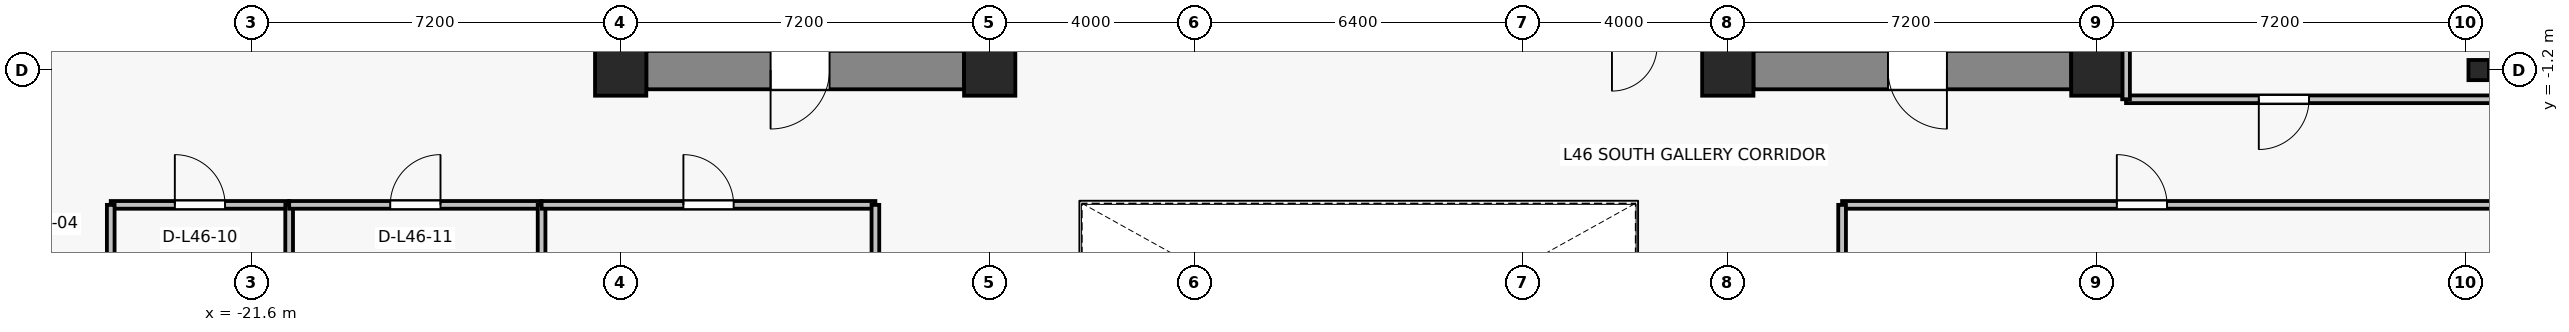
"""IFC4 building model, lengths in metres.
Left out: names, types, materials, properties, quantities, classifications, styles, units other than length and angle.
Written with IfcOpenShell. Run it as: python <this file> out.ifc"""

import sys

from ifc_helpers import new_model, si_unit, direction, frame, frame_2d, origin, origin_2d, place, context, subcontext, project, spatial, rectangle, i_section, extrude, source, transform, mapped, element, fill, save


model = new_model("IFC4")
c1 = context("Model", 3, precision=1e-05, world=origin(), true_north=direction((0.0, 1.0)))
c2 = subcontext(c1, "Body", "Model", "MODEL_VIEW")
j1 = project(units=[si_unit("LENGTHUNIT", "METRE"), si_unit("PLANEANGLEUNIT", "RADIAN")], contexts=[c1])
p1 = place(None, origin())
s1 = spatial("IfcSite", under=j1, at=p1, CompositionType="ELEMENT")
p2 = place(p1, origin())
s2 = spatial("IfcBuilding", under=s1, at=p2, CompositionType="ELEMENT")
p3 = place(p2, frame((0.0, 0.0, 166.0)))
s3 = spatial("IfcBuildingStorey", under=s2, at=p3, CompositionType="ELEMENT", Elevation=166.0)
for number, where, z_axis, x_axis in (
    (1, (-14.4, -1.2, 0.0), (0.0, 0.0, 1.0), (1.0, 0.0, 0.0)),
    (2, (-7.2, -1.2, 0.0), (0.0, 0.0, 1.0), (1.0, 0.0, 0.0)),
    (3, (7.2, -1.2, 0.0), (0.0, 0.0, 1.0), (1.0, 0.0, 0.0)),
    (4, (14.4, -1.2, 0.0), (0.0, 0.0, 1.0), (1.0, 0.0, 0.0)),
):
    element("IfcColumn", number, at=place(p3, frame(where, z_axis=z_axis, x_axis=x_axis)), inside=s3, PredefinedType="COLUMN", context=c2, shape_type="SweptSolid", body=[
        extrude(rectangle(XDim=1.0, YDim=1.0, at=origin_2d()), origin(), (0.0, 0.0, 1.0), 3.3),
    ])
p4 = place(p3, frame((21.85, -1.2, 0.0), z_axis=(0.0, 0.0, 1.0), x_axis=(1.0, 0.0, 0.0)))
e5 = element("IfcColumn", 5, at=p4, inside=s3, PredefinedType="COLUMN", context=c2, shape_type="SweptSolid", body=[
    extrude(i_section(OverallWidth=0.399, OverallDepth=0.394, WebThickness=0.023, FlangeThickness=0.037, FilletRadius=0.015, at=origin_2d()), origin(), (0.0, 0.0, 1.0), 3.3),
])
p5 = place(p3, frame((-7.7, -1.2, 0.0), z_axis=(0.0, 0.0, 1.0), x_axis=(-1.0, 0.0, 0.0)))
e6 = element("IfcWall", 6, at=p5, inside=s3, PredefinedType="SHEAR", context=c2, shape_type="SweptSolid", body=[
    extrude(rectangle(XDim=6.2, YDim=0.75, at=frame_2d((3.1, 0.0))), origin(), (0.0, 0.0, 1.0), 3.075),
])
p6 = place(p5, frame((2.625, 0.0, 0.0)))
e7 = element("IfcOpeningElement", 7, at=p6, cuts=e6, PredefinedType="OPENING", context=c2, shape_type="SweptSolid", body=[
    extrude(rectangle(XDim=1.15, YDim=2.15, at=frame_2d((0.575, 1.075))), frame((0.0, 0.385, 0.0), z_axis=(0.0, -1.0, 0.0), x_axis=(1.0, 0.0, 0.0)), (0.0, 0.0, 1.0), 0.77),
])
p7 = place(p3, frame((13.9, -1.2, 0.0), z_axis=(0.0, 0.0, 1.0), x_axis=(-1.0, 0.0, 0.0)))
e8 = element("IfcWall", 8, at=p7, inside=s3, PredefinedType="SHEAR", context=c2, shape_type="SweptSolid", body=[
    extrude(rectangle(XDim=6.2, YDim=0.75, at=frame_2d((3.1, 0.0))), origin(), (0.0, 0.0, 1.0), 3.075),
])
p8 = place(p7, frame((2.425, 0.0, 0.0)))
e9 = element("IfcOpeningElement", 9, at=p8, cuts=e8, PredefinedType="OPENING", context=c2, shape_type="SweptSolid", body=[
    extrude(rectangle(XDim=1.15, YDim=2.15, at=frame_2d((0.575, 1.075))), frame((0.0, 0.385, 0.0), z_axis=(0.0, -1.0, 0.0), x_axis=(1.0, 0.0, 0.0)), (0.0, 0.0, 1.0), 0.77),
])
p9 = place(p3, frame((-24.349, -3.83, 0.0), z_axis=(0.0, 0.0, 1.0), x_axis=(1.0, 0.0, 0.0)))
e10 = element("IfcWall", 10, at=p9, inside=s3, PredefinedType="PARTITIONING", context=c2, shape_type="SweptSolid", body=[
    extrude(rectangle(XDim=3.481, YDim=0.15, at=frame_2d((1.74, 0.0))), origin(), (0.0, 0.0, 1.0), 3.075),
])
p10 = place(p9, frame((1.25, 0.0, 0.0)))
e11 = element("IfcOpeningElement", 11, at=p10, cuts=e10, PredefinedType="OPENING", context=c2, shape_type="SweptSolid", body=[
    extrude(rectangle(XDim=0.98, YDim=2.15, at=frame_2d((0.49, 1.075))), frame((0.0, 0.085, 0.0), z_axis=(0.0, -1.0, 0.0), x_axis=(1.0, 0.0, 0.0)), (0.0, 0.0, 1.0), 0.17),
])
for number, where, z_axis, x_axis in (
    (12, (-24.349, -7.32, 0.0), (0.0, 0.0, 1.0), (0.0, 1.0, 0.0)),
    (13, (-20.868, -3.83, 0.0), (0.0, 0.0, 1.0), (0.0, -1.0, 0.0)),
):
    element("IfcWall", number, at=place(p3, frame(where, z_axis=z_axis, x_axis=x_axis)), inside=s3, PredefinedType="PARTITIONING", context=c2, shape_type="SweptSolid", body=[
        extrude(rectangle(XDim=3.49, YDim=0.15, at=frame_2d((1.745, 0.0))), origin(), (0.0, 0.0, 1.0), 3.075),
    ])
p11 = place(p3, frame((-20.868, -3.83, 0.0), z_axis=(0.0, 0.0, 1.0), x_axis=(1.0, 0.0, 0.0)))
e14 = element("IfcWall", 14, at=p11, inside=s3, PredefinedType="PARTITIONING", context=c2, shape_type="SweptSolid", body=[
    extrude(rectangle(XDim=4.925, YDim=0.15, at=frame_2d((2.462, 0.0))), origin(), (0.0, 0.0, 1.0), 3.075),
])
p12 = place(p11, frame((1.973, 0.0, 0.0)))
e15 = element("IfcOpeningElement", 15, at=p12, cuts=e14, PredefinedType="OPENING", context=c2, shape_type="SweptSolid", body=[
    extrude(rectangle(XDim=0.98, YDim=2.15, at=frame_2d((0.49, 1.075))), frame((0.0, 0.085, 0.0), z_axis=(0.0, -1.0, 0.0), x_axis=(1.0, 0.0, 0.0)), (0.0, 0.0, 1.0), 0.17),
])
p13 = place(p3, frame((-15.943, -3.83, 0.0), z_axis=(0.0, 0.0, 1.0), x_axis=(0.0, -1.0, 0.0)))
e16 = element("IfcWall", 16, at=p13, inside=s3, PredefinedType="PARTITIONING", context=c2, shape_type="SweptSolid", body=[
    extrude(rectangle(XDim=3.49, YDim=0.15, at=frame_2d((1.745, 0.0))), origin(), (0.0, 0.0, 1.0), 3.075),
])
p14 = place(p3, frame((-15.943, -3.83, 0.0), z_axis=(0.0, 0.0, 1.0), x_axis=(1.0, 0.0, 0.0)))
e17 = element("IfcWall", 17, at=p14, inside=s3, PredefinedType="PARTITIONING", context=c2, shape_type="SweptSolid", body=[
    extrude(rectangle(XDim=6.513, YDim=0.15, at=frame_2d((3.257, 0.0))), origin(), (0.0, 0.0, 1.0), 2.565),
])
p15 = place(p14, frame((2.767, 0.0, 0.0)))
e18 = element("IfcOpeningElement", 18, at=p15, cuts=e17, PredefinedType="OPENING", context=c2, shape_type="SweptSolid", body=[
    extrude(rectangle(XDim=0.98, YDim=2.15, at=frame_2d((0.49, 1.075))), frame((0.0, 0.085, 0.0), z_axis=(0.0, -1.0, 0.0), x_axis=(1.0, 0.0, 0.0)), (0.0, 0.0, 1.0), 0.17),
])
p16 = place(p3, frame((-9.43, -3.83, 0.0), z_axis=(0.0, 0.0, 1.0), x_axis=(0.0, -1.0, 0.0)))
e19 = element("IfcWall", 19, at=p16, inside=s3, PredefinedType="PARTITIONING", context=c2, shape_type="SweptSolid", body=[
    extrude(rectangle(XDim=3.49, YDim=0.15, at=frame_2d((1.745, 0.0))), origin(), (0.0, 0.0, 1.0), 2.665),
])
p17 = place(p3, frame((9.43, -3.83, 0.0), z_axis=(0.0, 0.0, 1.0), x_axis=(1.0, 0.0, 0.0)))
e20 = element("IfcWall", 20, at=p17, inside=s3, PredefinedType="PARTITIONING", context=c2, shape_type="SweptSolid", body=[
    extrude(rectangle(XDim=13.1, YDim=0.15, at=frame_2d((6.55, 0.0))), origin(), (0.0, 0.0, 1.0), 2.565),
])
p18 = place(p17, frame((5.36, 0.0, 0.0)))
e21 = element("IfcOpeningElement", 21, at=p18, cuts=e20, PredefinedType="OPENING", context=c2, shape_type="SweptSolid", body=[
    extrude(rectangle(XDim=0.98, YDim=2.15, at=frame_2d((0.49, 1.075))), frame((0.0, 0.085, 0.0), z_axis=(0.0, -1.0, 0.0), x_axis=(1.0, 0.0, 0.0)), (0.0, 0.0, 1.0), 0.17),
])
p19 = place(p3, frame((9.43, -7.32, 0.0), z_axis=(0.0, 0.0, 1.0), x_axis=(0.0, 1.0, 0.0)))
e22 = element("IfcWall", 22, at=p19, inside=s3, PredefinedType="PARTITIONING", context=c2, shape_type="SweptSolid", body=[
    extrude(rectangle(XDim=3.49, YDim=0.15, at=frame_2d((1.745, 0.0))), origin(), (0.0, 0.0, 1.0), 2.665),
])
p20 = place(p3, frame((22.53, -1.77, 0.0), z_axis=(0.0, 0.0, 1.0), x_axis=(-1.0, 0.0, 0.0)))
e23 = element("IfcWall", 23, at=p20, inside=s3, PredefinedType="PARTITIONING", context=c2, shape_type="SweptSolid", body=[
    extrude(rectangle(XDim=7.56, YDim=0.15, at=frame_2d((3.78, 0.0))), origin(), (0.0, 0.0, 1.0), 2.565),
])
p21 = place(p20, frame((3.99, 0.0, 0.0)))
e24 = element("IfcOpeningElement", 24, at=p21, cuts=e23, PredefinedType="OPENING", context=c2, shape_type="SweptSolid", body=[
    extrude(rectangle(XDim=0.98, YDim=2.15, at=frame_2d((0.49, 1.075))), frame((0.0, 0.085, 0.0), z_axis=(0.0, -1.0, 0.0), x_axis=(1.0, 0.0, 0.0)), (0.0, 0.0, 1.0), 0.17),
])
p22 = place(p3, frame((14.97, -1.77, 0.0), z_axis=(0.0, 0.0, 1.0), x_axis=(0.0, 1.0, 0.0)))
e25 = element("IfcWall", 25, at=p22, inside=s3, PredefinedType="PARTITIONING", context=c2, shape_type="SweptSolid", body=[
    extrude(rectangle(XDim=1.07, YDim=0.15, at=frame_2d((0.535, 0.0))), origin(), (0.0, 0.0, 1.0), 2.565),
])
m1 = source(origin(), c2, "Body", "SweptSolid", [
    extrude(rectangle(XDim=1.15, YDim=2.15, at=frame_2d((0.575, 1.075))), frame((0.0, 0.025, 0.0), z_axis=(0.0, -1.0, 0.0), x_axis=(1.0, 0.0, 0.0)), (0.0, 0.0, 1.0), 0.05),
])
p23 = place(p6, origin())
e26 = element("IfcDoor", 26, at=p23, inside=s3, OperationType="SINGLE_SWING_RIGHT", PredefinedType="DOOR", context=c2, shape_type="MappedRepresentation", body=[
    mapped(m1, transform((0.0, 0.0, 0.0), x_axis=(1.0, 0.0, 0.0), y_axis=(0.0, 1.0, 0.0), z_axis=(0.0, 0.0, 1.0), scale=1.0)),
])
fill(e7, e26)
p24 = place(p8, origin())
e27 = element("IfcDoor", 27, at=p24, inside=s3, OperationType="SINGLE_SWING_LEFT", PredefinedType="DOOR", context=c2, shape_type="MappedRepresentation", body=[
    mapped(m1, transform((0.0, 0.0, 0.0), x_axis=(1.0, 0.0, 0.0), y_axis=(0.0, 1.0, 0.0), z_axis=(0.0, 0.0, 1.0), scale=1.0)),
])
fill(e9, e27)
m2 = source(origin(), c2, "Body", "SweptSolid", [
    extrude(rectangle(XDim=0.98, YDim=2.15, at=frame_2d((0.49, 1.075))), frame((0.0, 0.025, 0.0), z_axis=(0.0, -1.0, 0.0), x_axis=(1.0, 0.0, 0.0)), (0.0, 0.0, 1.0), 0.05),
])
p25 = place(p10, origin())
e28 = element("IfcDoor", 28, at=p25, inside=s3, OperationType="SINGLE_SWING_LEFT", PredefinedType="DOOR", context=c2, shape_type="MappedRepresentation", body=[
    mapped(m2, transform((0.0, 0.0, 0.0), x_axis=(1.0, 0.0, 0.0), y_axis=(0.0, 1.0, 0.0), z_axis=(0.0, 0.0, 1.0), scale=1.0)),
])
fill(e11, e28)
p26 = place(p12, origin())
e29 = element("IfcDoor", 29, at=p26, inside=s3, OperationType="SINGLE_SWING_RIGHT", PredefinedType="DOOR", context=c2, shape_type="MappedRepresentation", body=[
    mapped(m2, transform((0.0, 0.0, 0.0), x_axis=(1.0, 0.0, 0.0), y_axis=(0.0, 1.0, 0.0), z_axis=(0.0, 0.0, 1.0), scale=1.0)),
])
fill(e15, e29)
p27 = place(p15, origin())
e30 = element("IfcDoor", 30, at=p27, inside=s3, OperationType="SINGLE_SWING_LEFT", PredefinedType="DOOR", context=c2, shape_type="MappedRepresentation", body=[
    mapped(m2, transform((0.0, 0.0, 0.0), x_axis=(1.0, 0.0, 0.0), y_axis=(0.0, 1.0, 0.0), z_axis=(0.0, 0.0, 1.0), scale=1.0)),
])
fill(e18, e30)
p28 = place(p18, origin())
e31 = element("IfcDoor", 31, at=p28, inside=s3, OperationType="SINGLE_SWING_LEFT", PredefinedType="DOOR", context=c2, shape_type="MappedRepresentation", body=[
    mapped(m2, transform((0.0, 0.0, 0.0), x_axis=(1.0, 0.0, 0.0), y_axis=(0.0, 1.0, 0.0), z_axis=(0.0, 0.0, 1.0), scale=1.0)),
])
fill(e21, e31)
p29 = place(p21, origin())
e32 = element("IfcDoor", 32, at=p29, inside=s3, OperationType="SINGLE_SWING_RIGHT", PredefinedType="DOOR", context=c2, shape_type="MappedRepresentation", body=[
    mapped(m2, transform((0.0, 0.0, 0.0), x_axis=(1.0, 0.0, 0.0), y_axis=(0.0, 1.0, 0.0), z_axis=(0.0, 0.0, 1.0), scale=1.0)),
])
fill(e24, e32)
save(model, sys.argv[1])
